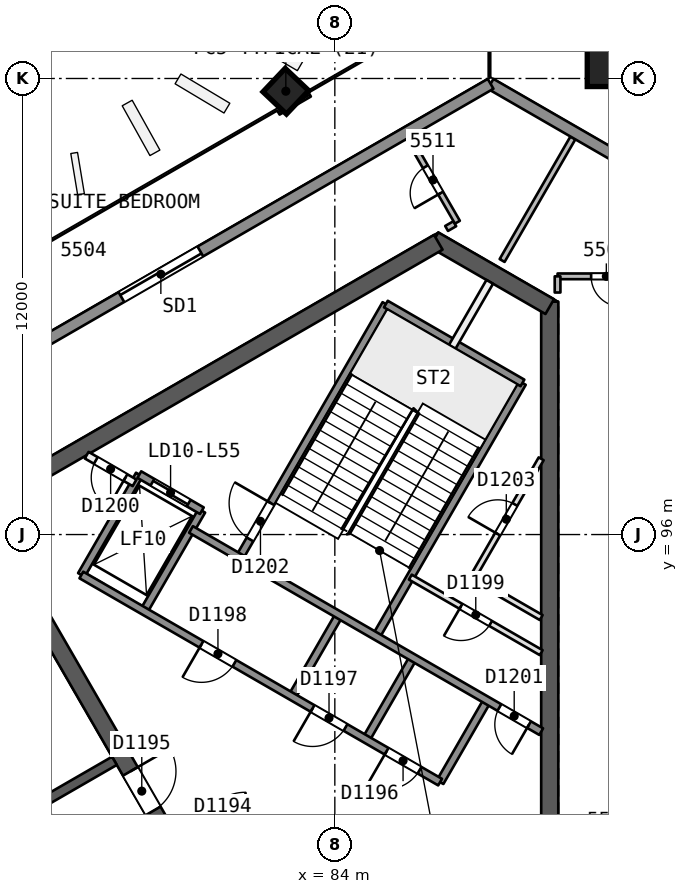
"""IFC4 building model, lengths in metres.
Left out: names, types, materials, properties, quantities, classifications, styles, units other than length and angle.
Written with IfcOpenShell. Run it as: python <this file> out.ifc"""

import sys

from ifc_helpers import new_model, si_unit, direction, frame, frame_2d, origin, origin_2d, place, context, subcontext, project, spatial, rectangle, extrude, element, fill, save


model = new_model("IFC4")
c1 = context("Model", 3, precision=1e-05, world=origin(), true_north=direction((0.0, 1.0)))
c2 = subcontext(c1, "Body", "Model", "MODEL_VIEW")
j1 = project(units=[si_unit("LENGTHUNIT", "METRE"), si_unit("PLANEANGLEUNIT", "RADIAN")], contexts=[c1])
p1 = place(None, origin())
s1 = spatial("IfcSite", under=j1, at=p1, CompositionType="ELEMENT")
p2 = place(p1, origin())
s2 = spatial("IfcBuilding", under=s1, at=p2, CompositionType="ELEMENT")
p3 = place(p2, frame((0.0, 0.0, 224.3)))
s3 = spatial("IfcBuildingStorey", under=s2, at=p3, CompositionType="ELEMENT", Elevation=224.3)
p4 = place(p3, frame((89.655, 88.019, 0.0), z_axis=(0.0, 0.0, 1.0), x_axis=(0.0, 1.0, 0.0)))
e1 = element("IfcWall", 1, at=p4, inside=s3, PredefinedType="SHEAR", context=c2, shape_type="SweptSolid", body=[
    extrude(rectangle(XDim=14.108, YDim=0.45, at=frame_2d((7.054, 0.0))), origin(), (0.0, 0.0, 1.0), 3.7),
])
p5 = place(p3, frame((89.655, 101.998, 0.0), z_axis=(0.0, 0.0, 1.0), x_axis=(-0.866042179588, 0.49997094233, 0.0)))
e2 = element("IfcWall", 2, at=p5, inside=s3, PredefinedType="SHEAR", context=c2, shape_type="SweptSolid", body=[
    extrude(rectangle(XDim=3.515, YDim=0.45, at=frame_2d((1.758, 0.0))), origin(), (0.0, 0.0, 1.0), 3.7),
])
p6 = place(p3, frame((86.723, 103.69, 0.0), z_axis=(0.0, 0.0, 1.0), x_axis=(-0.866022713978, -0.500004658852, 0.0)))
e3 = element("IfcWall", 3, at=p6, inside=s3, PredefinedType="SHEAR", context=c2, shape_type="SweptSolid", body=[
    extrude(rectangle(XDim=14.203, YDim=0.45, at=frame_2d((7.102, 0.0))), origin(), (0.0, 0.0, 1.0), 3.7),
])
p7 = place(p3, frame((74.617, 96.701, 0.0), z_axis=(0.0, 0.0, 1.0), x_axis=(0.499994385119, -0.866028645513, 0.0)))
e4 = element("IfcWall", 4, at=p7, inside=s3, PredefinedType="SHEAR", context=c2, shape_type="SweptSolid", body=[
    extrude(rectangle(XDim=10.155, YDim=0.45, at=frame_2d((5.077, 0.0))), origin(), (0.0, 0.0, 1.0), 3.7),
])
p8 = place(p7, frame((8.005, 0.0, 0.0)))
e5 = element("IfcOpeningElement", 5, at=p8, cuts=e4, PredefinedType="OPENING", context=c2, shape_type="SweptSolid", body=[
    extrude(rectangle(XDim=1.2, YDim=2.1, at=frame_2d((0.6, 1.05))), frame((0.0, 0.235, 0.0), z_axis=(0.0, -1.0, 0.0), x_axis=(1.0, 0.0, 0.0)), (0.0, 0.0, 1.0), 0.471),
])
p9 = place(p3, frame((78.2, 90.046, 0.0), z_axis=(0.0, 0.0, 1.0), x_axis=(-0.866026492143, -0.499998114903, 0.0)))
e6 = element("IfcWall", 6, at=p9, inside=s3, PredefinedType="SHEAR", context=c2, shape_type="SweptSolid", body=[
    extrude(rectangle(XDim=15.588, YDim=0.25, at=frame_2d((7.794, 0.0))), origin(), (0.0, 0.0, 1.0), 3.3),
])
p10 = place(p9, frame((2.15, 0.0, 0.0)))
e7 = element("IfcOpeningElement", 7, at=p10, cuts=e6, PredefinedType="OPENING", context=c2, shape_type="SweptSolid", body=[
    extrude(rectangle(XDim=1.0, YDim=2.1, at=frame_2d((0.5, 1.05))), frame((0.0, 0.135, 0.0), z_axis=(0.0, -1.0, 0.0), x_axis=(1.0, 0.0, 0.0)), (0.0, 0.0, 1.0), 0.271),
])
p11 = place(p9, frame((8.538, 0.0, 0.0)))
e8 = element("IfcOpeningElement", 8, at=p11, cuts=e6, PredefinedType="OPENING", context=c2, shape_type="SweptSolid", body=[
    extrude(rectangle(XDim=1.1, YDim=2.1, at=frame_2d((0.55, 1.05))), frame((0.0, 0.135, 0.0), z_axis=(0.0, -1.0, 0.0), x_axis=(1.0, 0.0, 0.0)), (0.0, 0.0, 1.0), 0.271),
])
p12 = place(p9, frame((12.282, 0.0, 0.0)))
e9 = element("IfcOpeningElement", 9, at=p12, cuts=e6, PredefinedType="OPENING", context=c2, shape_type="SweptSolid", body=[
    extrude(rectangle(XDim=1.0, YDim=2.1, at=frame_2d((0.5, 1.05))), frame((0.0, 0.135, 0.0), z_axis=(0.0, -1.0, 0.0), x_axis=(1.0, 0.0, 0.0)), (0.0, 0.0, 1.0), 0.271),
])
p13 = place(p3, frame((91.613, 108.775, 0.0), z_axis=(-0.017541078386, -0.030532027415, 0.999379860649), x_axis=(0.867090277759, -0.498151031531, 1.37663e-07)))
e10 = element("IfcColumn", 10, at=p13, inside=s3, PredefinedType="COLUMN", context=c2, shape_type="SweptSolid", body=[
    extrude(rectangle(XDim=1.9, YDim=1.9, at=origin_2d()), origin(), (0.0, 0.0, 1.0), 3.702),
])
p14 = place(p3, frame((82.721, 107.699, 0.0), z_axis=(-0.008376454378, -0.028163354484, 0.999568237028), x_axis=(0.865850871468, 0.499846877556, 0.02133933866)))
e11 = element("IfcColumn", 11, at=p14, inside=s3, PredefinedType="COLUMN", context=c2, shape_type="SweptSolid", body=[
    extrude(rectangle(XDim=0.85, YDim=0.85, at=origin_2d()), origin(), (0.0, 0.0, 1.0), 3.702),
])
p15 = place(p3, frame((92.428, 102.794, 0.0), z_axis=(0.0, 0.0, 1.0), x_axis=(-1.0, 0.0, 0.0)))
e12 = element("IfcWall", 12, at=p15, inside=s3, PredefinedType="PARTITIONING", context=c2, shape_type="SweptSolid", body=[
    extrude(rectangle(XDim=2.567, YDim=0.15, at=frame_2d((1.284, 0.0))), origin(), (0.0, 0.0, 1.0), 3.3),
])
p16 = place(p15, frame((0.884, 0.0, 0.0)))
e13 = element("IfcOpeningElement", 13, at=p16, cuts=e12, PredefinedType="OPENING", context=c2, shape_type="SweptSolid", body=[
    extrude(rectangle(XDim=0.8, YDim=2.1, at=frame_2d((0.4, 1.05))), frame((0.0, 0.085, 0.0), z_axis=(0.0, -1.0, 0.0), x_axis=(1.0, 0.0, 0.0)), (0.0, 0.0, 1.0), 0.171),
])
p17 = place(p3, frame((89.861, 102.794, 0.0), z_axis=(0.0, 0.0, 1.0), x_axis=(0.0, -1.0, 0.0)))
e14 = element("IfcWall", 14, at=p17, inside=s3, PredefinedType="PARTITIONING", context=c2, shape_type="SweptSolid", body=[
    extrude(rectangle(XDim=0.426, YDim=0.15, at=frame_2d((0.213, 0.0))), origin(), (0.0, 0.0, 1.0), 3.3),
])
p18 = place(p3, frame((90.264, 106.437, 0.0), z_axis=(0.0, 0.0, 1.0), x_axis=(-0.499966389646, -0.866044807862, 0.0)))
e15 = element("IfcWall", 15, at=p18, inside=s3, PredefinedType="PARTITIONING", context=c2, shape_type="SweptSolid", body=[
    extrude(rectangle(XDim=3.725, YDim=0.15, at=frame_2d((1.863, 0.0))), origin(), (0.0, 0.0, 1.0), 3.3),
])
p19 = place(p3, frame((86.941, 104.054, 0.0), z_axis=(0.0, 0.0, 1.0), x_axis=(0.865808178054, 0.500376057396, 0.0)))
e16 = element("IfcWall", 16, at=p19, inside=s3, PredefinedType="PARTITIONING", context=c2, shape_type="SweptSolid", body=[
    extrude(rectangle(XDim=0.248, YDim=0.15, at=frame_2d((0.124, 0.0))), origin(), (0.0, 0.0, 1.0), 3.3),
])
p20 = place(p3, frame((87.225, 104.218, 0.0), z_axis=(0.0, 0.0, 1.0), x_axis=(-0.500046250861, 0.86599869919, 0.0)))
e17 = element("IfcWall", 17, at=p20, inside=s3, PredefinedType="PARTITIONING", context=c2, shape_type="SweptSolid", body=[
    extrude(rectangle(XDim=2.567, YDim=0.15, at=frame_2d((1.284, 0.0))), origin(), (0.0, 0.0, 1.0), 3.3),
])
p21 = place(p20, frame((0.884, 0.0, 0.0)))
e18 = element("IfcOpeningElement", 18, at=p21, cuts=e17, PredefinedType="OPENING", context=c2, shape_type="SweptSolid", body=[
    extrude(rectangle(XDim=0.8, YDim=2.1, at=frame_2d((0.4, 1.05))), frame((0.0, 0.085, 0.0), z_axis=(0.0, -1.0, 0.0), x_axis=(1.0, 0.0, 0.0)), (0.0, 0.0, 1.0), 0.171),
])
p22 = place(p3, frame((88.099, 107.859, 0.0), z_axis=(0.0, 0.0, 1.0), x_axis=(0.866032272612, -0.499988102653, 0.0)))
e19 = element("IfcWall", 19, at=p22, inside=s3, PredefinedType="SOLIDWALL", context=c2, shape_type="SweptSolid", body=[
    extrude(rectangle(XDim=5.171, YDim=0.3, at=frame_2d((2.585, 0.0))), origin(), (0.0, 0.0, 1.0), 3.3),
])
p23 = place(p3, frame((44.324, 82.585, 0.0), z_axis=(0.0, 0.0, 1.0), x_axis=(0.86602584856, 0.499999229625, 0.0)))
e20 = element("IfcWall", 20, at=p23, inside=s3, PredefinedType="SOLIDWALL", context=c2, shape_type="SweptSolid", body=[
    extrude(rectangle(XDim=50.547, YDim=0.3, at=frame_2d((25.274, 0.0))), origin(), (0.0, 0.0, 1.0), 3.3),
])
p24 = place(p23, frame((24.23, 0.0, 0.0)))
e21 = element("IfcOpeningElement", 21, at=p24, cuts=e20, PredefinedType="OPENING", context=c2, shape_type="SweptSolid", body=[
    extrude(rectangle(XDim=2.4, YDim=2.4, at=frame_2d((1.2, 1.2))), frame((0.0, 0.161, 0.0), z_axis=(0.0, -1.0, 0.0), x_axis=(1.0, 0.0, 0.0)), (0.0, 0.0, 1.0), 0.321),
])
p25 = place(p23, frame((29.218, 0.0, 0.0)))
e22 = element("IfcOpeningElement", 22, at=p25, cuts=e20, PredefinedType="OPENING", context=c2, shape_type="SweptSolid", body=[
    extrude(rectangle(XDim=2.4, YDim=2.4, at=frame_2d((1.2, 1.2))), frame((0.0, 0.161, 0.0), z_axis=(0.0, -1.0, 0.0), x_axis=(1.0, 0.0, 0.0)), (0.0, 0.0, 1.0), 0.321),
])
p26 = place(p23, frame((39.328, 0.0, 0.0)))
e23 = element("IfcOpeningElement", 23, at=p26, cuts=e20, PredefinedType="OPENING", context=c2, shape_type="SweptSolid", body=[
    extrude(rectangle(XDim=2.4, YDim=2.4, at=frame_2d((1.2, 1.2))), frame((0.0, 0.161, 0.0), z_axis=(0.0, -1.0, 0.0), x_axis=(1.0, 0.0, 0.0)), (0.0, 0.0, 1.0), 0.321),
])
p27 = place(p23, frame((19.085, 0.0, 0.0)))
e24 = element("IfcOpeningElement", 24, at=p27, cuts=e20, PredefinedType="OPENING", context=c2, shape_type="SweptSolid", body=[
    extrude(rectangle(XDim=2.4, YDim=2.4, at=frame_2d((1.2, 1.2))), frame((0.0, 0.161, 0.0), z_axis=(0.0, -1.0, 0.0), x_axis=(1.0, 0.0, 0.0)), (0.0, 0.0, 1.0), 0.321),
])
p28 = place(p23, frame((8.771, 0.0, 0.0)))
e25 = element("IfcOpeningElement", 25, at=p28, cuts=e20, PredefinedType="OPENING", context=c2, shape_type="SweptSolid", body=[
    extrude(rectangle(XDim=2.4, YDim=2.4, at=frame_2d((1.2, 1.2))), frame((0.0, 0.161, 0.0), z_axis=(0.0, -1.0, 0.0), x_axis=(1.0, 0.0, 0.0)), (0.0, 0.0, 1.0), 0.321),
])
p29 = place(p3, frame((86.77, 89.486, 0.0), z_axis=(0.0, 0.0, 1.0), x_axis=(0.499961042966, 0.86604789447, 0.0)))
e26 = element("IfcWall", 26, at=p29, inside=s3, PredefinedType="SOLIDWALL", context=c2, shape_type="SweptSolid", body=[
    extrude(rectangle(XDim=2.48, YDim=0.2, at=frame_2d((1.24, 0.0))), origin(), (0.0, 0.0, 1.0), 3.3),
])
p30 = place(p3, frame((87.621, 94.86, 0.0), z_axis=(0.0, 0.0, 1.0), x_axis=(0.499993116331, 0.866029378036, 0.0)))
e27 = element("IfcWall", 27, at=p30, inside=s3, PredefinedType="PARTITIONING", context=c2, shape_type="SweptSolid", body=[
    extrude(rectangle(XDim=3.618, YDim=0.15, at=frame_2d((1.809, 0.0))), origin(), (0.0, 0.0, 1.0), 3.3),
])
p31 = place(p30, frame((1.332, 0.0, 0.0)))
e28 = element("IfcOpeningElement", 28, at=p31, cuts=e27, PredefinedType="OPENING", context=c2, shape_type="SweptSolid", body=[
    extrude(rectangle(XDim=0.9, YDim=2.1, at=frame_2d((0.45, 1.05))), frame((0.0, 0.085, 0.0), z_axis=(0.0, -1.0, 0.0), x_axis=(1.0, 0.0, 0.0)), (0.0, 0.0, 1.0), 0.171),
])
p32 = place(p3, frame((84.821, 90.611, 0.0), z_axis=(0.0, 0.0, 1.0), x_axis=(0.499961042966, 0.86604789447, 0.0)))
e29 = element("IfcWall", 29, at=p32, inside=s3, PredefinedType="SOLIDWALL", context=c2, shape_type="SweptSolid", body=[
    extrude(rectangle(XDim=2.48, YDim=0.2, at=frame_2d((1.24, 0.0))), origin(), (0.0, 0.0, 1.0), 3.3),
])
p33 = place(p3, frame((85.087, 93.321, 0.0), z_axis=(0.0, 0.0, 1.0), x_axis=(0.500019787375, 0.866013979237, 0.0)))
e30 = element("IfcWall", 30, at=p33, inside=s3, PredefinedType="SOLIDWALL", context=c2, shape_type="SweptSolid", body=[
    extrude(rectangle(XDim=7.7, YDim=0.2, at=frame_2d((3.85, 0.0))), origin(), (0.0, 0.0, 1.0), 3.3),
])
p34 = place(p3, frame((82.873, 91.736, 0.0), z_axis=(0.0, 0.0, 1.0), x_axis=(0.499961042966, 0.86604789447, 0.0)))
e31 = element("IfcWall", 31, at=p34, inside=s3, PredefinedType="SOLIDWALL", context=c2, shape_type="SweptSolid", body=[
    extrude(rectangle(XDim=2.48, YDim=0.2, at=frame_2d((1.24, 0.0))), origin(), (0.0, 0.0, 1.0), 3.3),
])
p35 = place(p3, frame((87.09, 100.94, 0.0), z_axis=(0.0, 0.0, 1.0), x_axis=(0.500011643316, 0.866018681408, 0.0)))
e32 = element("IfcWall", 32, at=p35, inside=s3, PredefinedType="PARTITIONING", context=c2, shape_type="SweptSolid", body=[
    extrude(rectangle(XDim=1.973, YDim=0.2, at=frame_2d((0.987, 0.0))), origin(), (0.0, 0.0, 1.0), 3.3),
])
p36 = place(p3, frame((81.493, 95.396, 0.0), z_axis=(0.0, 0.0, 1.0), x_axis=(0.500006057782, 0.866021906294, 0.0)))
e33 = element("IfcWall", 33, at=p36, inside=s3, PredefinedType="SOLIDWALL", context=c2, shape_type="SweptSolid", body=[
    extrude(rectangle(XDim=7.7, YDim=0.2, at=frame_2d((3.85, 0.0))), origin(), (0.0, 0.0, 1.0), 3.3),
])
p37 = place(p36, frame((0.55, 0.0, 0.0)))
e34 = element("IfcOpeningElement", 34, at=p37, cuts=e33, PredefinedType="OPENING", context=c2, shape_type="SweptSolid", body=[
    extrude(rectangle(XDim=1.1, YDim=2.1, at=frame_2d((0.55, 1.05))), frame((0.0, 0.11, 0.0), z_axis=(0.0, -1.0, 0.0), x_axis=(1.0, 0.0, 0.0)), (0.0, 0.0, 1.0), 0.221),
])
for number, where, z_axis, x_axis in (
    (35, (78.976, 93.986, 0.0), (0.0, 0.0, 1.0), (0.5, 0.866, 0.0)),
    (36, (77.33, 94.936, 0.0), (0.0, 0.0, 1.0), (0.5, 0.866, 0.0)),
):
    element("IfcWall", number, at=place(p3, frame(where, z_axis=z_axis, x_axis=x_axis)), inside=s3, PredefinedType="SOLIDWALL", context=c2, shape_type="SweptSolid", body=[
        extrude(rectangle(XDim=3.05, YDim=0.2, at=frame_2d((1.525, 0.0))), origin(), (0.0, 0.0, 1.0), 3.3),
    ])
p38 = place(p3, frame((86.77, 89.486, 0.0), z_axis=(0.0, 0.0, 1.0), x_axis=(-0.86601811187, 0.500012629753, 0.0)))
e37 = element("IfcWall", 37, at=p38, inside=s3, PredefinedType="SOLIDWALL", context=c2, shape_type="SweptSolid", body=[
    extrude(rectangle(XDim=10.9, YDim=0.2, at=frame_2d((5.45, 0.0))), origin(), (0.0, 0.0, 1.0), 3.3),
])
p39 = place(p38, frame((0.625, 0.0, 0.0)))
e38 = element("IfcOpeningElement", 38, at=p39, cuts=e37, PredefinedType="OPENING", context=c2, shape_type="SweptSolid", body=[
    extrude(rectangle(XDim=1.0, YDim=2.1, at=frame_2d((0.5, 1.05))), frame((0.0, 0.11, 0.0), z_axis=(0.0, -1.0, 0.0), x_axis=(1.0, 0.0, 0.0)), (0.0, 0.0, 1.0), 0.221),
])
p40 = place(p38, frame((2.875, 0.0, 0.0)))
e39 = element("IfcOpeningElement", 39, at=p40, cuts=e37, PredefinedType="OPENING", context=c2, shape_type="SweptSolid", body=[
    extrude(rectangle(XDim=1.0, YDim=2.1, at=frame_2d((0.5, 1.05))), frame((0.0, 0.11, 0.0), z_axis=(0.0, -1.0, 0.0), x_axis=(1.0, 0.0, 0.0)), (0.0, 0.0, 1.0), 0.221),
])
p41 = place(p38, frame((6.25, 0.0, 0.0)))
e40 = element("IfcOpeningElement", 40, at=p41, cuts=e37, PredefinedType="OPENING", context=c2, shape_type="SweptSolid", body=[
    extrude(rectangle(XDim=1.0, YDim=2.1, at=frame_2d((0.5, 1.05))), frame((0.0, 0.11, 0.0), z_axis=(0.0, -1.0, 0.0), x_axis=(1.0, 0.0, 0.0)), (0.0, 0.0, 1.0), 0.221),
])
p42 = place(p3, frame((89.43, 90.814, 0.0), z_axis=(0.0, 0.0, 1.0), x_axis=(-0.866018983788, 0.500011119594, 0.0)))
e41 = element("IfcWall", 41, at=p42, inside=s3, PredefinedType="SOLIDWALL", context=c2, shape_type="SweptSolid", body=[
    extrude(rectangle(XDim=10.64, YDim=0.2, at=frame_2d((5.32, 0.0))), origin(), (0.0, 0.0, 1.0), 3.3),
])
p43 = place(p42, frame((0.37, 0.0, 0.0)))
e42 = element("IfcOpeningElement", 42, at=p43, cuts=e41, PredefinedType="OPENING", context=c2, shape_type="SweptSolid", body=[
    extrude(rectangle(XDim=0.9, YDim=2.1, at=frame_2d((0.45, 1.05))), frame((0.0, 0.11, 0.0), z_axis=(0.0, -1.0, 0.0), x_axis=(1.0, 0.0, 0.0)), (0.0, 0.0, 1.0), 0.221),
])
p44 = place(p3, frame((78.73, 97.361, 0.0), z_axis=(0.0, 0.0, 1.0), x_axis=(-0.866045896294, 0.499964504253, 0.0)))
e43 = element("IfcWall", 43, at=p44, inside=s3, PredefinedType="PARTITIONING", context=c2, shape_type="SweptSolid", body=[
    extrude(rectangle(XDim=1.455, YDim=0.2, at=frame_2d((0.728, 0.0))), origin(), (0.0, 0.0, 1.0), 3.3),
])
p45 = place(p44, frame((0.278, 0.0, 0.0)))
e44 = element("IfcOpeningElement", 44, at=p45, cuts=e43, PredefinedType="OPENING", context=c2, shape_type="SweptSolid", body=[
    extrude(rectangle(XDim=0.9, YDim=2.1, at=frame_2d((0.45, 1.05))), frame((0.0, 0.11, 0.0), z_axis=(0.0, -1.0, 0.0), x_axis=(1.0, 0.0, 0.0)), (0.0, 0.0, 1.0), 0.221),
])
p46 = place(p3, frame((80.5, 96.627, 0.0), z_axis=(0.0, 0.0, 1.0), x_axis=(-0.86601224135, 0.500022797313, 0.0)))
e45 = element("IfcWall", 45, at=p46, inside=s3, PredefinedType="SOLIDWALL", context=c2, shape_type="SweptSolid", body=[
    extrude(rectangle(XDim=1.9, YDim=0.2, at=frame_2d((0.95, 0.0))), origin(), (0.0, 0.0, 1.0), 3.3),
])
p47 = place(p46, frame((0.4, 0.0, 0.0)))
e46 = element("IfcOpeningElement", 46, at=p47, cuts=e45, PredefinedType="OPENING", context=c2, shape_type="SweptSolid", body=[
    extrude(rectangle(XDim=1.1, YDim=2.1, at=frame_2d((0.55, 1.05))), frame((0.0, 0.11, 0.0), z_axis=(0.0, -1.0, 0.0), x_axis=(1.0, 0.0, 0.0)), (0.0, 0.0, 1.0), 0.221),
])
p48 = place(p3, frame((89.43, 92.892, 0.0), z_axis=(0.0, 0.0, 1.0), x_axis=(-0.866019912421, 0.500009511199, 0.0)))
e47 = element("IfcWall", 47, at=p48, inside=s3, PredefinedType="PARTITIONING", context=c2, shape_type="SweptSolid", body=[
    extrude(rectangle(XDim=3.976, YDim=0.15, at=frame_2d((1.988, 0.0))), origin(), (0.0, 0.0, 1.0), 3.3),
])
p49 = place(p48, frame((1.538, 0.0, 0.0)))
e48 = element("IfcOpeningElement", 48, at=p49, cuts=e47, PredefinedType="OPENING", context=c2, shape_type="SweptSolid", body=[
    extrude(rectangle(XDim=0.9, YDim=2.1, at=frame_2d((0.45, 1.05))), frame((0.0, 0.085, 0.0), z_axis=(0.0, -1.0, 0.0), x_axis=(1.0, 0.0, 0.0)), (0.0, 0.0, 1.0), 0.171),
])
p50 = place(p3, frame((89.43, 93.816, 0.0), z_axis=(0.0, 0.0, 1.0), x_axis=(-0.866004557827, 0.500036104519, 0.0)))
e49 = element("IfcWall", 49, at=p50, inside=s3, PredefinedType="PARTITIONING", context=c2, shape_type="SweptSolid", body=[
    extrude(rectangle(XDim=2.089, YDim=0.15, at=frame_2d((1.044, 0.0))), origin(), (0.0, 0.0, 1.0), 3.3),
])
p51 = place(p3, frame((88.937, 99.99, 0.0), z_axis=(0.0, 0.0, 1.0), x_axis=(-0.866004344652, 0.500036473714, 0.0)))
e50 = element("IfcWall", 50, at=p51, inside=s3, PredefinedType="SOLIDWALL", context=c2, shape_type="SweptSolid", body=[
    extrude(rectangle(XDim=4.15, YDim=0.2, at=frame_2d((2.075, 0.0))), origin(), (0.0, 0.0, 1.0), 3.3),
])
p52 = place(p16, origin())
e51 = element("IfcDoor", 51, at=p52, inside=s3, OperationType="SINGLE_SWING_LEFT", PredefinedType="NOTDEFINED", context=c2, shape_type="SweptSolid", body=[
    extrude(rectangle(XDim=0.8, YDim=2.1, at=frame_2d((0.4, 1.05))), frame((0.0, 0.025, 0.0), z_axis=(0.0, -1.0, 0.0), x_axis=(1.0, 0.0, 0.0)), (0.0, 0.0, 1.0), 0.05),
])
fill(e13, e51)
p53 = place(p21, origin())
e52 = element("IfcDoor", 52, at=p53, inside=s3, OperationType="SINGLE_SWING_LEFT", PredefinedType="NOTDEFINED", context=c2, shape_type="SweptSolid", body=[
    extrude(rectangle(XDim=0.8, YDim=2.1, at=frame_2d((0.4, 1.05))), frame((0.0, 0.025, 0.0), z_axis=(0.0, -1.0, 0.0), x_axis=(1.0, 0.0, 0.0)), (0.0, 0.0, 1.0), 0.05),
])
fill(e18, e52)
p54 = place(p26, origin())
e53 = element("IfcDoor", 53, at=p54, inside=s3, OperationType="SLIDING_TO_LEFT", PredefinedType="NOTDEFINED", context=c2, shape_type="SweptSolid", body=[
    extrude(rectangle(XDim=2.4, YDim=2.4, at=frame_2d((1.2, 1.2))), frame((0.0, 0.025, 0.0), z_axis=(0.0, -1.0, 0.0), x_axis=(1.0, 0.0, 0.0)), (0.0, 0.0, 1.0), 0.05),
])
fill(e23, e53)
p55 = place(p8, origin())
e54 = element("IfcDoor", 54, at=p55, inside=s3, OperationType="SINGLE_SWING_LEFT", PredefinedType="NOTDEFINED", context=c2, shape_type="SweptSolid", body=[
    extrude(rectangle(XDim=1.2, YDim=2.1, at=frame_2d((0.6, 1.05))), frame((0.0, 0.025, 0.0), z_axis=(0.0, -1.0, 0.0), x_axis=(1.0, 0.0, 0.0)), (0.0, 0.0, 1.0), 0.05),
])
fill(e5, e54)
p56 = place(p47, origin())
e55 = element("IfcDoor", 55, at=p56, inside=s3, OperationType="SLIDING_TO_RIGHT", PredefinedType="NOTDEFINED", context=c2, shape_type="SweptSolid", body=[
    extrude(rectangle(XDim=1.1, YDim=2.1, at=frame_2d((0.55, 1.05))), frame((0.0, 0.025, 0.0), z_axis=(0.0, -1.0, 0.0), x_axis=(1.0, 0.0, 0.0)), (0.0, 0.0, 1.0), 0.05),
])
fill(e46, e55)
p57 = place(p39, origin())
e56 = element("IfcDoor", 56, at=p57, inside=s3, OperationType="SINGLE_SWING_RIGHT", PredefinedType="NOTDEFINED", context=c2, shape_type="SweptSolid", body=[
    extrude(rectangle(XDim=1.0, YDim=2.1, at=frame_2d((0.5, 1.05))), frame((0.0, 0.025, 0.0), z_axis=(0.0, -1.0, 0.0), x_axis=(1.0, 0.0, 0.0)), (0.0, 0.0, 1.0), 0.05),
])
fill(e38, e56)
p58 = place(p40, origin())
e57 = element("IfcDoor", 57, at=p58, inside=s3, OperationType="SINGLE_SWING_RIGHT", PredefinedType="NOTDEFINED", context=c2, shape_type="SweptSolid", body=[
    extrude(rectangle(XDim=1.0, YDim=2.1, at=frame_2d((0.5, 1.05))), frame((0.0, 0.025, 0.0), z_axis=(0.0, -1.0, 0.0), x_axis=(1.0, 0.0, 0.0)), (0.0, 0.0, 1.0), 0.05),
])
fill(e39, e57)
p59 = place(p41, origin())
e58 = element("IfcDoor", 58, at=p59, inside=s3, OperationType="SINGLE_SWING_RIGHT", PredefinedType="NOTDEFINED", context=c2, shape_type="SweptSolid", body=[
    extrude(rectangle(XDim=1.0, YDim=2.1, at=frame_2d((0.5, 1.05))), frame((0.0, 0.025, 0.0), z_axis=(0.0, -1.0, 0.0), x_axis=(1.0, 0.0, 0.0)), (0.0, 0.0, 1.0), 0.05),
])
fill(e40, e58)
p60 = place(p49, origin())
e59 = element("IfcDoor", 59, at=p60, inside=s3, OperationType="SINGLE_SWING_RIGHT", PredefinedType="NOTDEFINED", context=c2, shape_type="SweptSolid", body=[
    extrude(rectangle(XDim=0.9, YDim=2.1, at=frame_2d((0.45, 1.05))), frame((0.0, 0.025, 0.0), z_axis=(0.0, -1.0, 0.0), x_axis=(1.0, 0.0, 0.0)), (0.0, 0.0, 1.0), 0.05),
])
fill(e48, e59)
p61 = place(p45, origin())
e60 = element("IfcDoor", 60, at=p61, inside=s3, OperationType="SINGLE_SWING_LEFT", PredefinedType="NOTDEFINED", context=c2, shape_type="SweptSolid", body=[
    extrude(rectangle(XDim=0.9, YDim=2.1, at=frame_2d((0.45, 1.05))), frame((0.0, 0.025, 0.0), z_axis=(0.0, -1.0, 0.0), x_axis=(1.0, 0.0, 0.0)), (0.0, 0.0, 1.0), 0.05),
])
fill(e44, e60)
p62 = place(p43, origin())
e61 = element("IfcDoor", 61, at=p62, inside=s3, OperationType="SINGLE_SWING_LEFT", PredefinedType="NOTDEFINED", context=c2, shape_type="SweptSolid", body=[
    extrude(rectangle(XDim=0.9, YDim=2.1, at=frame_2d((0.45, 1.05))), frame((0.0, 0.025, 0.0), z_axis=(0.0, -1.0, 0.0), x_axis=(1.0, 0.0, 0.0)), (0.0, 0.0, 1.0), 0.05),
])
fill(e42, e61)
p63 = place(p37, origin())
e62 = element("IfcDoor", 62, at=p63, inside=s3, OperationType="SINGLE_SWING_RIGHT", PredefinedType="NOTDEFINED", context=c2, shape_type="SweptSolid", body=[
    extrude(rectangle(XDim=1.1, YDim=2.1, at=frame_2d((0.55, 1.05))), frame((0.0, 0.025, 0.0), z_axis=(0.0, -1.0, 0.0), x_axis=(1.0, 0.0, 0.0)), (0.0, 0.0, 1.0), 0.05),
])
fill(e34, e62)
p64 = place(p31, origin())
e63 = element("IfcDoor", 63, at=p64, inside=s3, OperationType="SINGLE_SWING_LEFT", PredefinedType="NOTDEFINED", context=c2, shape_type="SweptSolid", body=[
    extrude(rectangle(XDim=0.9, YDim=2.1, at=frame_2d((0.45, 1.05))), frame((0.0, 0.025, 0.0), z_axis=(0.0, -1.0, 0.0), x_axis=(1.0, 0.0, 0.0)), (0.0, 0.0, 1.0), 0.05),
])
fill(e28, e63)
save(model, sys.argv[1])
